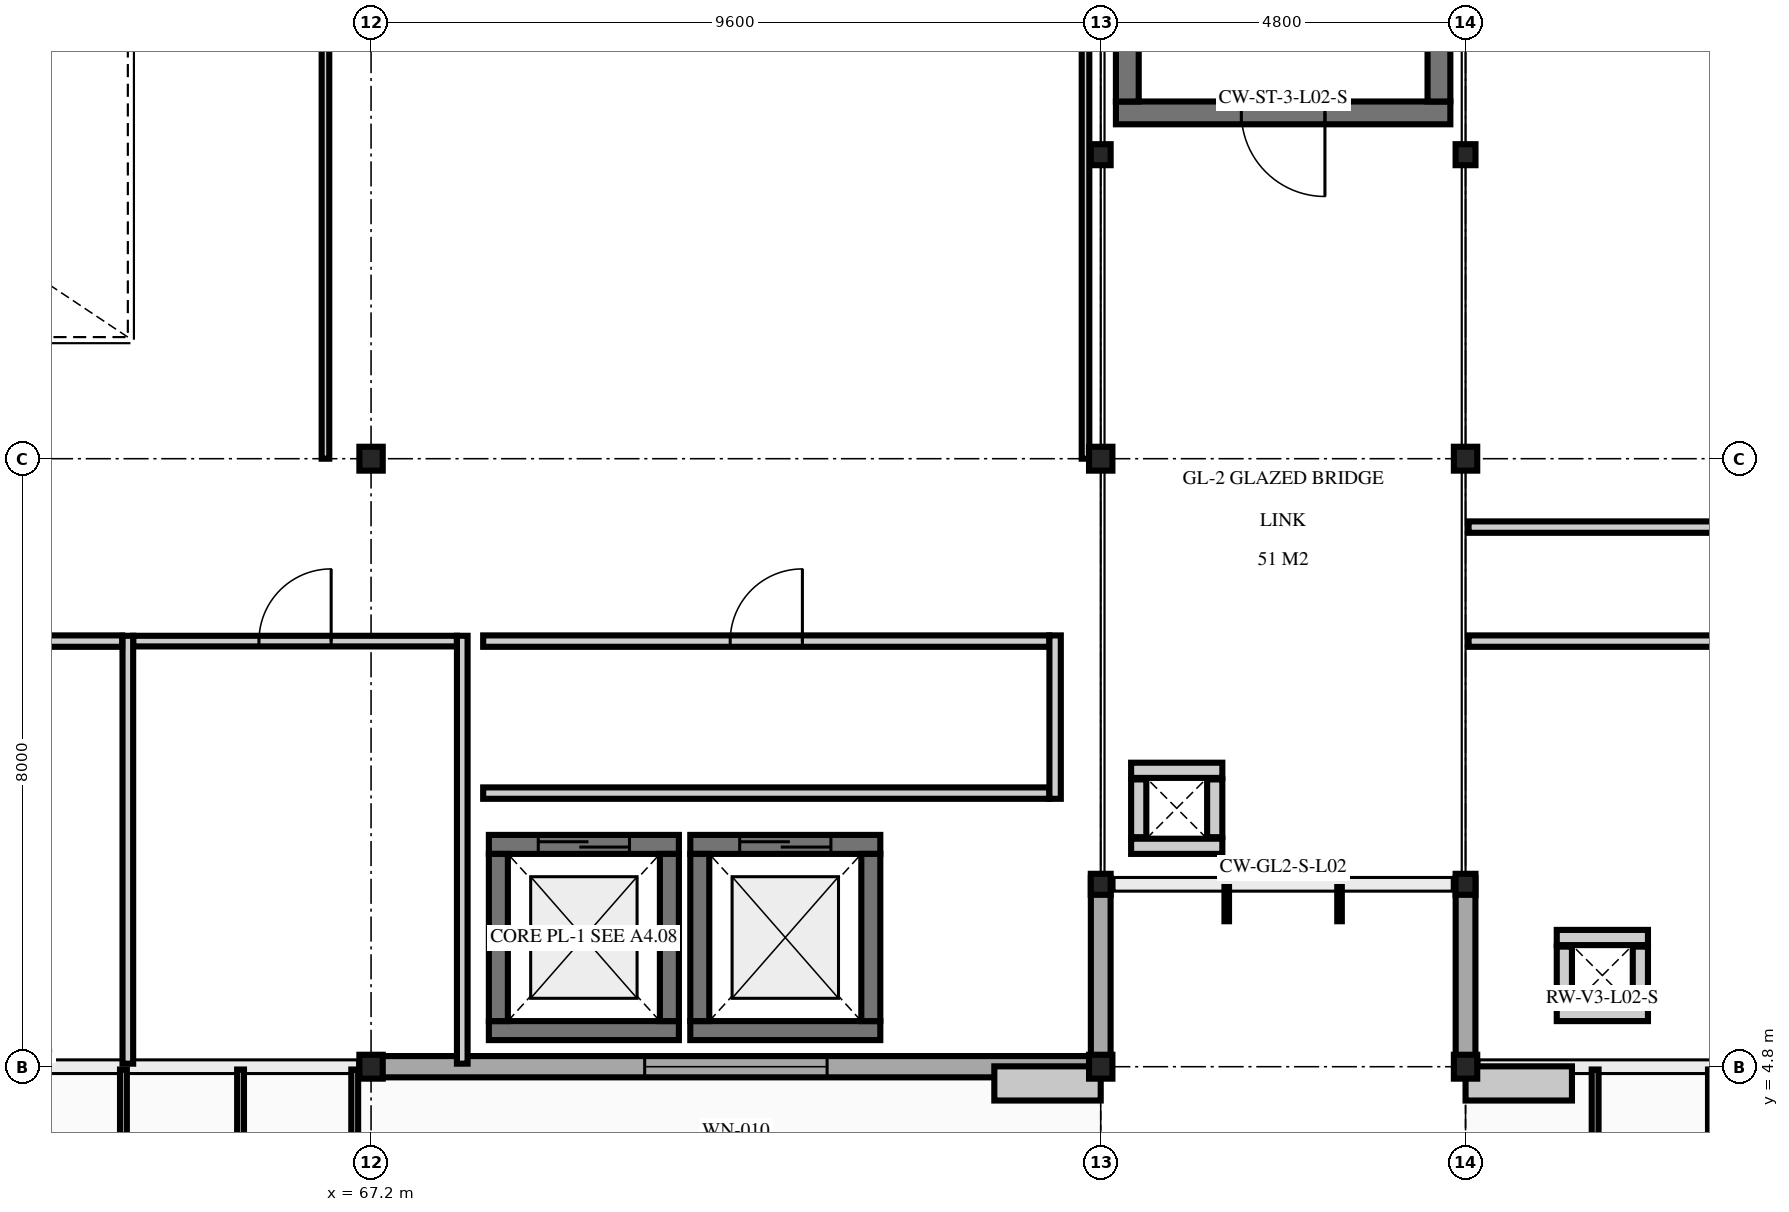
"""IFC4 building model, lengths in metres.
Left out: names, types, materials, properties, quantities, classifications, styles, units other than length and angle.
Written with IfcOpenShell. Run it as: python <this file> out.ifc"""

import sys

from ifc_helpers import new_model, si_unit, direction, frame, frame_2d, origin, origin_2d, place, context, subcontext, project, spatial, rectangle, i_section, extrude, element, fill, save


model = new_model("IFC4")
c1 = context("Model", 3, precision=1e-05, world=origin(), true_north=direction((0.0, 1.0)))
c2 = subcontext(c1, "Body", "Model", "MODEL_VIEW")
j1 = project(units=[si_unit("LENGTHUNIT", "METRE"), si_unit("PLANEANGLEUNIT", "RADIAN")], contexts=[c1])
p1 = place(None, origin())
s1 = spatial("IfcSite", under=j1, at=p1, CompositionType="ELEMENT")
p2 = place(p1, origin())
s2 = spatial("IfcBuilding", under=s1, at=p2, CompositionType="ELEMENT")
p3 = place(p2, frame((0.0, 0.0, 9.6)))
s3 = spatial("IfcBuildingStorey", under=s2, at=p3, CompositionType="ELEMENT", Elevation=9.6)
for number, where, z_axis, x_axis in (
    (1, (67.2, 4.8, 0.0), (0.0, 0.0, 1.0), (1.0, 0.0, 0.0)),
    (2, (67.2, 12.8, 0.0), (0.0, 0.0, 1.0), (1.0, 0.0, 0.0)),
    (3, (76.8, 4.8, 0.0), (0.0, 0.0, 1.0), (1.0, 0.0, 0.0)),
    (4, (76.8, 12.8, 0.0), (0.0, 0.0, 1.0), (1.0, 0.0, 0.0)),
):
    element("IfcColumn", number, at=place(p3, frame(where, z_axis=z_axis, x_axis=x_axis)), inside=s3, PredefinedType="COLUMN", context=c2, shape_type="SweptSolid", body=[
        extrude(i_section(OverallWidth=0.307, OverallDepth=0.314, WebThickness=0.012, FlangeThickness=0.019, at=origin_2d()), origin(), (0.0, 0.0, 1.0), 4.5),
    ])
for number, where, z_axis, x_axis in (
    (5, (76.8, 7.2, 0.0), (0.0, 0.0, 1.0), (1.0, 0.0, 0.0)),
    (6, (76.8, 16.8, 0.0), (0.0, 0.0, 1.0), (1.0, 0.0, 0.0)),
):
    element("IfcColumn", number, at=place(p3, frame(where, z_axis=z_axis, x_axis=x_axis)), inside=s3, PredefinedType="COLUMN", context=c2, shape_type="SweptSolid", body=[
        extrude(i_section(OverallWidth=0.261, OverallDepth=0.276, WebThickness=0.015, FlangeThickness=0.025, at=origin_2d()), origin(), (0.0, 0.0, 1.0), 4.5),
    ])
for number, where, z_axis, x_axis in (
    (7, (81.6, 4.8, 0.0), (0.0, 0.0, 1.0), (1.0, 0.0, 0.0)),
    (8, (81.6, 12.8, 0.0), (0.0, 0.0, 1.0), (1.0, 0.0, 0.0)),
):
    element("IfcColumn", number, at=place(p3, frame(where, z_axis=z_axis, x_axis=x_axis)), inside=s3, PredefinedType="COLUMN", context=c2, shape_type="SweptSolid", body=[
        extrude(i_section(OverallWidth=0.307, OverallDepth=0.314, WebThickness=0.012, FlangeThickness=0.019, at=origin_2d()), origin(), (0.0, 0.0, 1.0), 4.5),
    ])
for number, where, z_axis, x_axis in (
    (9, (81.6, 7.2, 0.0), (0.0, 0.0, 1.0), (1.0, 0.0, 0.0)),
    (10, (81.6, 16.8, 0.0), (0.0, 0.0, 1.0), (1.0, 0.0, 0.0)),
):
    element("IfcColumn", number, at=place(p3, frame(where, z_axis=z_axis, x_axis=x_axis)), inside=s3, PredefinedType="COLUMN", context=c2, shape_type="SweptSolid", body=[
        extrude(i_section(OverallWidth=0.261, OverallDepth=0.276, WebThickness=0.015, FlangeThickness=0.025, at=origin_2d()), origin(), (0.0, 0.0, 1.0), 4.5),
    ])
p4 = place(p3, frame((81.4, 17.35, 0.0), z_axis=(0.0, 0.0, 1.0), x_axis=(-1.0, 0.0, 0.0)))
e11 = element("IfcWall", 11, at=p4, inside=s3, PredefinedType="SHEAR", context=c2, shape_type="SweptSolid", body=[
    extrude(rectangle(XDim=4.4, YDim=0.3, at=frame_2d((2.2, 0.0))), origin(), (0.0, 0.0, 1.0), 4.26),
])
p5 = place(p4, frame((1.65, 0.0, 0.0)))
e12 = element("IfcOpeningElement", 12, at=p5, cuts=e11, PredefinedType="OPENING", context=c2, shape_type="SweptSolid", body=[
    extrude(rectangle(XDim=1.1, YDim=2.2, at=frame_2d((0.55, 1.1))), frame((0.0, 0.16, 0.0), z_axis=(0.0, -1.0, 0.0), x_axis=(1.0, 0.0, 0.0)), (0.0, 0.0, 1.0), 0.32),
])
for number, where, z_axis, x_axis in (
    (13, (77.15, 17.5, 0.0), (0.0, 0.0, 1.0), (0.0, 1.0, 0.0)),
    (14, (81.25, 25.3, 0.0), (0.0, 0.0, 1.0), (0.0, -1.0, 0.0)),
):
    element("IfcWall", number, at=place(p3, frame(where, z_axis=z_axis, x_axis=x_axis)), inside=s3, PredefinedType="SHEAR", context=c2, shape_type="SweptSolid", body=[
        extrude(rectangle(XDim=7.8, YDim=0.3, at=frame_2d((3.9, 0.0))), origin(), (0.0, 0.0, 1.0), 4.26),
    ])
p6 = place(p3, frame((71.25, 5.275, 0.0), z_axis=(0.0, 0.0, 1.0), x_axis=(-1.0, 0.0, 0.0)))
e15 = element("IfcWall", 15, at=p6, inside=s3, PredefinedType="SHEAR", context=c2, shape_type="SweptSolid", body=[
    extrude(rectangle(XDim=2.5, YDim=0.25, at=frame_2d((1.25, 0.0))), origin(), (0.0, 0.0, 1.0), 4.26),
])
p7 = place(p3, frame((68.75, 7.725, 0.0), z_axis=(0.0, 0.0, 1.0), x_axis=(1.0, 0.0, 0.0)))
e16 = element("IfcWall", 16, at=p7, inside=s3, PredefinedType="SHEAR", context=c2, shape_type="SweptSolid", body=[
    extrude(rectangle(XDim=2.5, YDim=0.25, at=frame_2d((1.25, 0.0))), origin(), (0.0, 0.0, 1.0), 4.26),
])
p8 = place(p7, frame((0.65, 0.0, 0.0)))
e17 = element("IfcOpeningElement", 17, at=p8, cuts=e16, PredefinedType="OPENING", context=c2, shape_type="SweptSolid", body=[
    extrude(rectangle(XDim=1.2, YDim=2.2, at=frame_2d((0.6, 1.1))), frame((0.0, 0.135, 0.0), z_axis=(0.0, -1.0, 0.0), x_axis=(1.0, 0.0, 0.0)), (0.0, 0.0, 1.0), 0.27),
])
for number, where, z_axis, x_axis in (
    (18, (68.875, 5.4, 0.0), (0.0, 0.0, 1.0), (0.0, 1.0, 0.0)),
    (19, (71.125, 7.6, 0.0), (0.0, 0.0, 1.0), (0.0, -1.0, 0.0)),
):
    element("IfcWall", number, at=place(p3, frame(where, z_axis=z_axis, x_axis=x_axis)), inside=s3, PredefinedType="SHEAR", context=c2, shape_type="SweptSolid", body=[
        extrude(rectangle(XDim=2.2, YDim=0.25, at=frame_2d((1.1, 0.0))), origin(), (0.0, 0.0, 1.0), 4.26),
    ])
p9 = place(p3, frame((73.9, 5.275, 0.0), z_axis=(0.0, 0.0, 1.0), x_axis=(-1.0, 0.0, 0.0)))
e20 = element("IfcWall", 20, at=p9, inside=s3, PredefinedType="SHEAR", context=c2, shape_type="SweptSolid", body=[
    extrude(rectangle(XDim=2.5, YDim=0.25, at=frame_2d((1.25, 0.0))), origin(), (0.0, 0.0, 1.0), 4.26),
])
p10 = place(p3, frame((71.4, 7.725, 0.0), z_axis=(0.0, 0.0, 1.0), x_axis=(1.0, 0.0, 0.0)))
e21 = element("IfcWall", 21, at=p10, inside=s3, PredefinedType="SHEAR", context=c2, shape_type="SweptSolid", body=[
    extrude(rectangle(XDim=2.5, YDim=0.25, at=frame_2d((1.25, 0.0))), origin(), (0.0, 0.0, 1.0), 4.26),
])
p11 = place(p10, frame((0.65, 0.0, 0.0)))
e22 = element("IfcOpeningElement", 22, at=p11, cuts=e21, PredefinedType="OPENING", context=c2, shape_type="SweptSolid", body=[
    extrude(rectangle(XDim=1.2, YDim=2.2, at=frame_2d((0.6, 1.1))), frame((0.0, 0.135, 0.0), z_axis=(0.0, -1.0, 0.0), x_axis=(1.0, 0.0, 0.0)), (0.0, 0.0, 1.0), 0.27),
])
for number, where, z_axis, x_axis in (
    (23, (71.525, 5.4, 0.0), (0.0, 0.0, 1.0), (0.0, 1.0, 0.0)),
    (24, (73.775, 7.6, 0.0), (0.0, 0.0, 1.0), (0.0, -1.0, 0.0)),
):
    element("IfcWall", number, at=place(p3, frame(where, z_axis=z_axis, x_axis=x_axis)), inside=s3, PredefinedType="SHEAR", context=c2, shape_type="SweptSolid", body=[
        extrude(rectangle(XDim=2.2, YDim=0.25, at=frame_2d((1.1, 0.0))), origin(), (0.0, 0.0, 1.0), 4.26),
    ])
for number, where, z_axis, x_axis in (
    (25, (84.0, 5.5, 0.0), (0.0, 0.0, 1.0), (-1.0, 0.0, 0.0)),
    (26, (82.8, 6.5, 0.0), (0.0, 0.0, 1.0), (1.0, 0.0, 0.0)),
):
    element("IfcWall", number, at=place(p3, frame(where, z_axis=z_axis, x_axis=x_axis)), inside=s3, PredefinedType="PARTITIONING", context=c2, shape_type="SweptSolid", body=[
        extrude(rectangle(XDim=1.2, YDim=0.2, at=frame_2d((0.6, 0.0))), origin(), (0.0, 0.0, 1.0), 3.76),
    ])
for number, where, z_axis, x_axis in (
    (27, (82.9, 5.62, 0.0), (0.0, 0.0, 1.0), (0.0, 1.0, 0.0)),
    (28, (83.9, 6.38, 0.0), (0.0, 0.0, 1.0), (0.0, -1.0, 0.0)),
):
    element("IfcWall", number, at=place(p3, frame(where, z_axis=z_axis, x_axis=x_axis)), inside=s3, PredefinedType="PARTITIONING", context=c2, shape_type="SweptSolid", body=[
        extrude(rectangle(XDim=0.76, YDim=0.2, at=frame_2d((0.38, 0.0))), origin(), (0.0, 0.0, 1.0), 3.76),
    ])
for number, where, z_axis, x_axis in (
    (29, (78.4, 7.7, 0.0), (0.0, 0.0, 1.0), (-1.0, 0.0, 0.0)),
    (30, (77.2, 8.7, 0.0), (0.0, 0.0, 1.0), (1.0, 0.0, 0.0)),
):
    element("IfcWall", number, at=place(p3, frame(where, z_axis=z_axis, x_axis=x_axis)), inside=s3, PredefinedType="PARTITIONING", context=c2, shape_type="SweptSolid", body=[
        extrude(rectangle(XDim=1.2, YDim=0.2, at=frame_2d((0.6, 0.0))), origin(), (0.0, 0.0, 1.0), 3.76),
    ])
for number, where, z_axis, x_axis in (
    (31, (77.3, 7.82, 0.0), (0.0, 0.0, 1.0), (0.0, 1.0, 0.0)),
    (32, (78.3, 8.58, 0.0), (0.0, 0.0, 1.0), (0.0, -1.0, 0.0)),
):
    element("IfcWall", number, at=place(p3, frame(where, z_axis=z_axis, x_axis=x_axis)), inside=s3, PredefinedType="PARTITIONING", context=c2, shape_type="SweptSolid", body=[
        extrude(rectangle(XDim=0.76, YDim=0.2, at=frame_2d((0.38, 0.0))), origin(), (0.0, 0.0, 1.0), 3.76),
    ])
p12 = place(p3, frame((76.885, 4.8, 0.0), z_axis=(0.0, 0.0, 1.0), x_axis=(-1.0, 0.0, 0.0)))
e33 = element("IfcWall", 33, at=p12, inside=s3, PredefinedType="SOLIDWALL", context=c2, shape_type="SweptSolid", body=[
    extrude(rectangle(XDim=9.77, YDim=0.28, at=frame_2d((4.885, 0.0))), origin(), (0.0, 0.0, 1.0), 3.925),
])
p13 = place(p12, frame((3.685, 0.0, 0.95)))
e34 = element("IfcOpeningElement", 34, at=p13, cuts=e33, PredefinedType="OPENING", context=c2, shape_type="SweptSolid", body=[
    extrude(rectangle(XDim=2.4, YDim=2.1, at=frame_2d((1.2, 1.05))), frame((0.0, 0.15, 0.0), z_axis=(0.0, -1.0, 0.0), x_axis=(1.0, 0.0, 0.0)), (0.0, 0.0, 1.0), 0.3),
])
p14 = place(p3, frame((76.8, 7.285, 0.0), z_axis=(0.0, 0.0, 1.0), x_axis=(0.0, -1.0, 0.0)))
e35 = element("IfcWall", 35, at=p14, inside=s3, PredefinedType="SOLIDWALL", context=c2, shape_type="SweptSolid", body=[
    extrude(rectangle(XDim=2.57, YDim=0.26, at=frame_2d((1.285, 0.0))), origin(), (0.0, 0.0, 1.0), 3.845),
])
p15 = place(p3, frame((81.6, 4.715, 0.0), z_axis=(0.0, 0.0, 1.0), x_axis=(0.0, 1.0, 0.0)))
e36 = element("IfcWall", 36, at=p15, inside=s3, PredefinedType="SOLIDWALL", context=c2, shape_type="SweptSolid", body=[
    extrude(rectangle(XDim=2.57, YDim=0.26, at=frame_2d((1.285, 0.0))), origin(), (0.0, 0.0, 1.0), 3.775),
])
p16 = place(p3, frame((64.07, 10.4, 0.0), z_axis=(0.0, 0.0, 1.0), x_axis=(1.0, 0.0, 0.0)))
e37 = element("IfcWall", 37, at=p16, inside=s3, PredefinedType="PARTITIONING", context=c2, shape_type="SweptSolid", body=[
    extrude(rectangle(XDim=4.26, YDim=0.14, at=frame_2d((2.13, 0.0))), origin(), (0.0, 0.0, 1.0), 3.955),
])
p17 = place(p16, frame((1.655, 0.0, 0.0)))
e38 = element("IfcOpeningElement", 38, at=p17, cuts=e37, PredefinedType="OPENING", context=c2, shape_type="SweptSolid", body=[
    extrude(rectangle(XDim=0.95, YDim=2.1, at=frame_2d((0.475, 1.05))), frame((0.0, 0.08, 0.0), z_axis=(0.0, -1.0, 0.0), x_axis=(1.0, 0.0, 0.0)), (0.0, 0.0, 1.0), 0.16),
])
for number, where, z_axis, x_axis in (
    (39, (64.0, 4.84, 0.0), (0.0, 0.0, 1.0), (0.0, 1.0, 0.0)),
    (40, (68.4, 4.84, 0.0), (0.0, 0.0, 1.0), (0.0, 1.0, 0.0)),
):
    element("IfcWall", number, at=place(p3, frame(where, z_axis=z_axis, x_axis=x_axis)), inside=s3, PredefinedType="PARTITIONING", context=c2, shape_type="SweptSolid", body=[
        extrude(rectangle(XDim=5.63, YDim=0.14, at=frame_2d((2.815, 0.0))), origin(), (0.0, 0.0, 1.0), 3.925),
    ])
p18 = place(p3, frame((57.6, 10.4, 0.0), z_axis=(0.0, 0.0, 1.0), x_axis=(1.0, 0.0, 0.0)))
e41 = element("IfcWall", 41, at=p18, inside=s3, PredefinedType="PARTITIONING", context=c2, shape_type="SweptSolid", body=[
    extrude(rectangle(XDim=6.325, YDim=0.15, at=frame_2d((3.163, 0.0))), origin(), (0.0, 0.0, 1.0), 3.955),
])
p19 = place(p18, frame((2.587, 0.0, 0.0)))
e42 = element("IfcOpeningElement", 42, at=p19, cuts=e41, PredefinedType="OPENING", context=c2, shape_type="SweptSolid", body=[
    extrude(rectangle(XDim=1.15, YDim=2.25, at=frame_2d((0.575, 1.125))), frame((0.0, 0.085, 0.0), z_axis=(0.0, -1.0, 0.0), x_axis=(1.0, 0.0, 0.0)), (0.0, 0.0, 1.0), 0.17),
])
p20 = place(p3, frame((68.675, 8.4, 0.0), z_axis=(0.0, 0.0, 1.0), x_axis=(1.0, 0.0, 0.0)))
e43 = element("IfcWall", 43, at=p20, inside=s3, PredefinedType="PARTITIONING", context=c2, shape_type="SweptSolid", body=[
    extrude(rectangle(XDim=7.45, YDim=0.15, at=frame_2d((3.725, 0.0))), origin(), (0.0, 0.0, 1.0), 4.035),
])
p21 = place(p3, frame((68.675, 10.4, 0.0), z_axis=(0.0, 0.0, 1.0), x_axis=(1.0, 0.0, 0.0)))
e44 = element("IfcWall", 44, at=p21, inside=s3, PredefinedType="PARTITIONING", context=c2, shape_type="SweptSolid", body=[
    extrude(rectangle(XDim=7.45, YDim=0.15, at=frame_2d((3.725, 0.0))), origin(), (0.0, 0.0, 1.0), 4.035),
])
p22 = place(p21, frame((3.25, 0.0, 0.0)))
e45 = element("IfcOpeningElement", 45, at=p22, cuts=e44, PredefinedType="OPENING", context=c2, shape_type="SweptSolid", body=[
    extrude(rectangle(XDim=0.95, YDim=2.15, at=frame_2d((0.475, 1.075))), frame((0.0, 0.085, 0.0), z_axis=(0.0, -1.0, 0.0), x_axis=(1.0, 0.0, 0.0)), (0.0, 0.0, 1.0), 0.17),
])
p23 = place(p3, frame((76.2, 8.325, 0.0), z_axis=(0.0, 0.0, 1.0), x_axis=(0.0, 1.0, 0.0)))
e46 = element("IfcWall", 46, at=p23, inside=s3, PredefinedType="PARTITIONING", context=c2, shape_type="SweptSolid", body=[
    extrude(rectangle(XDim=2.15, YDim=0.15, at=frame_2d((1.075, 0.0))), origin(), (0.0, 0.0, 1.0), 4.26),
])
p24 = place(p3, frame((66.6, 12.8, 0.0), z_axis=(0.0, 0.0, 1.0), x_axis=(0.0, 1.0, 0.0)))
e47 = element("IfcWall", 47, at=p24, inside=s3, PredefinedType="MOVABLE", context=c2, shape_type="SweptSolid", body=[
    extrude(rectangle(XDim=23.96, YDim=0.1, at=frame_2d((11.98, 0.0))), origin(), (0.0, 0.0, 1.0), 3.925),
])
p25 = place(p24, frame((9.93, 0.0, 0.0)))
e48 = element("IfcOpeningElement", 48, at=p25, cuts=e47, PredefinedType="OPENING", context=c2, shape_type="SweptSolid", body=[
    extrude(rectangle(XDim=1.6, YDim=2.25, at=frame_2d((0.8, 1.125))), frame((0.0, 0.06, 0.0), z_axis=(0.0, -1.0, 0.0), x_axis=(1.0, 0.0, 0.0)), (0.0, 0.0, 1.0), 0.12),
])
p26 = place(p3, frame((76.6, 12.8, 0.0), z_axis=(0.0, 0.0, 1.0), x_axis=(0.0, 1.0, 0.0)))
e49 = element("IfcWall", 49, at=p26, inside=s3, PredefinedType="MOVABLE", context=c2, shape_type="SweptSolid", body=[
    extrude(rectangle(XDim=23.96, YDim=0.1, at=frame_2d((11.98, 0.0))), origin(), (0.0, 0.0, 1.0), 3.925),
])
p27 = place(p3, frame((81.64, 10.4, 0.0), z_axis=(0.0, 0.0, 1.0), x_axis=(1.0, 0.0, 0.0)))
e50 = element("IfcWall", 50, at=p27, inside=s3, PredefinedType="PARTITIONING", context=c2, shape_type="SweptSolid", body=[
    extrude(rectangle(XDim=15.885, YDim=0.15, at=frame_2d((7.942, 0.0))), origin(), (0.0, 0.0, 1.0), 3.775),
])
p28 = place(p27, frame((7.468, 0.0, 0.0)))
e51 = element("IfcOpeningElement", 51, at=p28, cuts=e50, PredefinedType="OPENING", context=c2, shape_type="SweptSolid", body=[
    extrude(rectangle(XDim=0.95, YDim=2.15, at=frame_2d((0.475, 1.075))), frame((0.0, 0.085, 0.0), z_axis=(0.0, -1.0, 0.0), x_axis=(1.0, 0.0, 0.0)), (0.0, 0.0, 1.0), 0.17),
])
p29 = place(p3, frame((81.64, 11.9, 0.0), z_axis=(0.0, 0.0, 1.0), x_axis=(1.0, 0.0, 0.0)))
e52 = element("IfcWall", 52, at=p29, inside=s3, PredefinedType="PARTITIONING", context=c2, shape_type="SweptSolid", body=[
    extrude(rectangle(XDim=25.485, YDim=0.15, at=frame_2d((12.743, 0.0))), origin(), (0.0, 0.0, 1.0), 3.775),
])
p30 = place(p29, frame((12.268, 0.0, 0.0)))
e53 = element("IfcOpeningElement", 53, at=p30, cuts=e52, PredefinedType="OPENING", context=c2, shape_type="SweptSolid", body=[
    extrude(rectangle(XDim=0.95, YDim=2.15, at=frame_2d((0.475, 1.075))), frame((0.0, 0.085, 0.0), z_axis=(0.0, -1.0, 0.0), x_axis=(1.0, 0.0, 0.0)), (0.0, 0.0, 1.0), 0.17),
])
p31 = place(p5, origin())
e54 = element("IfcDoor", 54, at=p31, inside=s3, OperationType="SINGLE_SWING_LEFT", PredefinedType="DOOR", context=c2, shape_type="SweptSolid", body=[
    extrude(rectangle(XDim=1.1, YDim=2.2, at=frame_2d((0.55, 1.1))), frame((0.0, 0.025, 0.0), z_axis=(0.0, -1.0, 0.0), x_axis=(1.0, 0.0, 0.0)), (0.0, 0.0, 1.0), 0.05),
])
fill(e12, e54)
p32 = place(p8, origin())
e55 = element("IfcDoor", 55, at=p32, inside=s3, OperationType="DOUBLE_DOOR_SLIDING", PredefinedType="DOOR", context=c2, shape_type="SweptSolid", body=[
    extrude(rectangle(XDim=1.2, YDim=2.2, at=frame_2d((0.6, 1.1))), frame((0.0, 0.025, 0.0), z_axis=(0.0, -1.0, 0.0), x_axis=(1.0, 0.0, 0.0)), (0.0, 0.0, 1.0), 0.05),
])
fill(e17, e55)
p33 = place(p11, origin())
e56 = element("IfcDoor", 56, at=p33, inside=s3, OperationType="DOUBLE_DOOR_SLIDING", PredefinedType="DOOR", context=c2, shape_type="SweptSolid", body=[
    extrude(rectangle(XDim=1.2, YDim=2.2, at=frame_2d((0.6, 1.1))), frame((0.0, 0.025, 0.0), z_axis=(0.0, -1.0, 0.0), x_axis=(1.0, 0.0, 0.0)), (0.0, 0.0, 1.0), 0.05),
])
fill(e22, e56)
p34 = place(p13, origin())
e57 = element("IfcWindow", 57, at=p34, inside=s3, PartitioningType="SINGLE_PANEL", PredefinedType="WINDOW", context=c2, shape_type="SweptSolid", body=[
    extrude(rectangle(XDim=2.4, YDim=2.1, at=frame_2d((1.2, 1.05))), frame((0.0, 0.03, 0.0), z_axis=(0.0, -1.0, 0.0), x_axis=(1.0, 0.0, 0.0)), (0.0, 0.0, 1.0), 0.06),
])
fill(e34, e57)
p35 = place(p17, origin())
e58 = element("IfcDoor", 58, at=p35, inside=s3, OperationType="SINGLE_SWING_RIGHT", PredefinedType="DOOR", context=c2, shape_type="SweptSolid", body=[
    extrude(rectangle(XDim=0.95, YDim=2.1, at=frame_2d((0.475, 1.05))), frame((0.0, 0.025, 0.0), z_axis=(0.0, -1.0, 0.0), x_axis=(1.0, 0.0, 0.0)), (0.0, 0.0, 1.0), 0.05),
])
fill(e38, e58)
p36 = place(p22, origin())
e59 = element("IfcDoor", 59, at=p36, inside=s3, OperationType="SINGLE_SWING_RIGHT", PredefinedType="DOOR", context=c2, shape_type="SweptSolid", body=[
    extrude(rectangle(XDim=0.95, YDim=2.15, at=frame_2d((0.475, 1.075))), frame((0.0, 0.025, 0.0), z_axis=(0.0, -1.0, 0.0), x_axis=(1.0, 0.0, 0.0)), (0.0, 0.0, 1.0), 0.05),
])
fill(e45, e59)
save(model, sys.argv[1])
